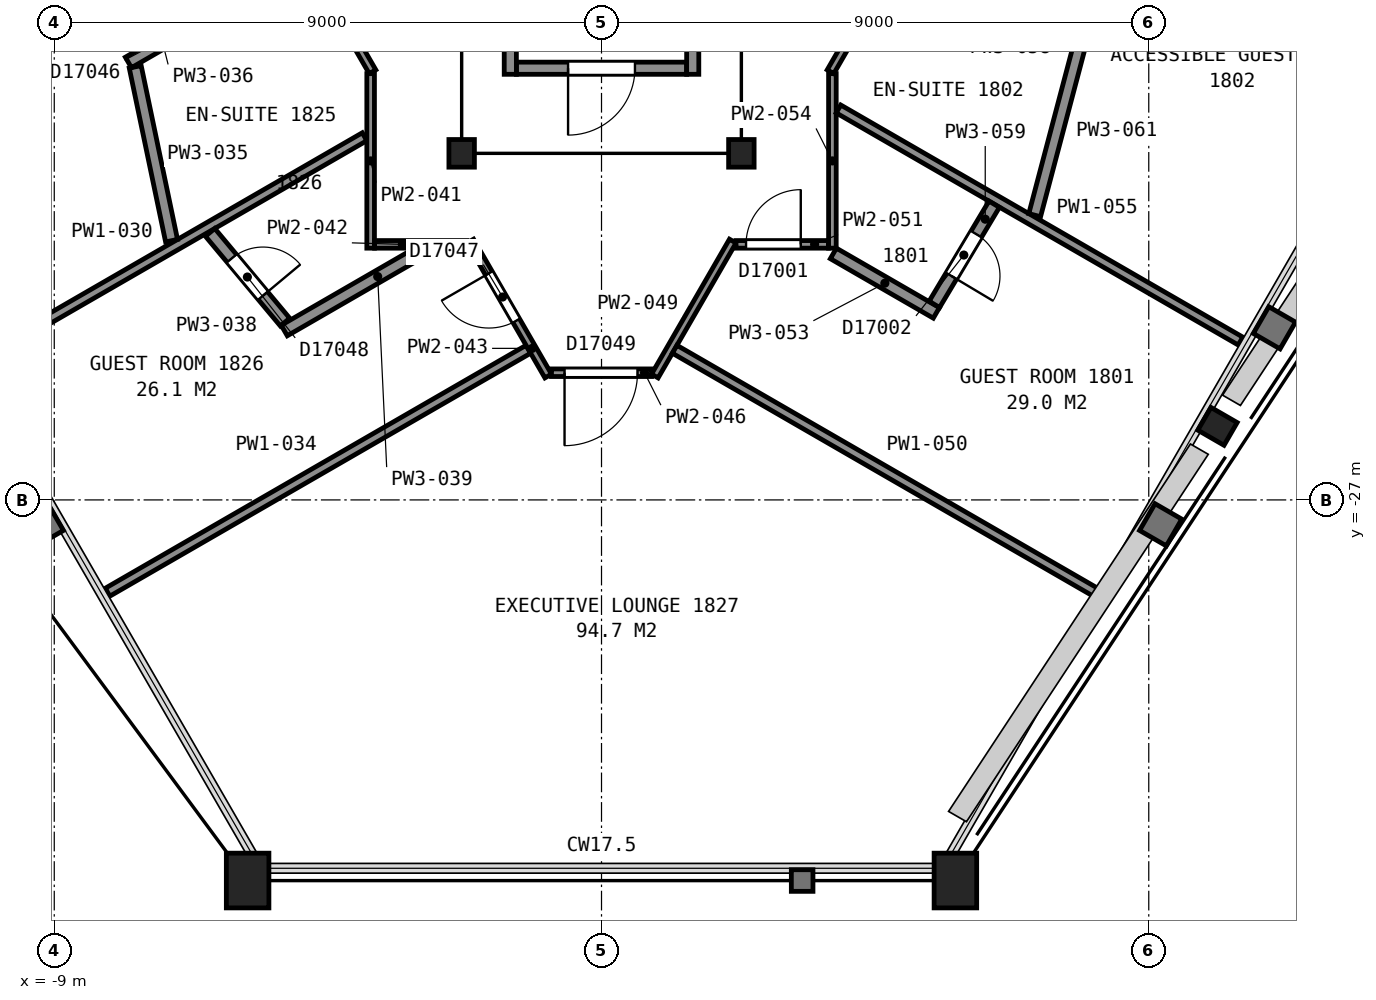
"""IFC4 building model, lengths in metres.
Left out: names, types, materials, properties, quantities, classifications, styles, units other than length and angle.
Written with IfcOpenShell. Run it as: python <this file> out.ifc"""

import sys

from ifc_helpers import new_model, si_unit, direction, frame, frame_2d, origin, origin_2d, place, context, subcontext, project, spatial, rectangle, hollow_rectangle, i_section, extrude, element, fill, save


model = new_model("IFC4")
c1 = context("Model", 3, precision=1e-05, world=origin(), true_north=direction((0.0, 1.0)))
c2 = subcontext(c1, "Body", "Model", "MODEL_VIEW")
j1 = project(units=[si_unit("LENGTHUNIT", "METRE"), si_unit("PLANEANGLEUNIT", "RADIAN")], contexts=[c1])
p1 = place(None, origin())
s1 = spatial("IfcSite", under=j1, at=p1, CompositionType="ELEMENT")
p2 = place(p1, origin())
s2 = spatial("IfcBuilding", under=s1, at=p2, CompositionType="ELEMENT")
p3 = place(p2, frame((0.0, 0.0, 80.0)))
s3 = spatial("IfcBuildingStorey", under=s2, at=p3, CompositionType="ELEMENT", Elevation=80.0)
for number, where, z_axis, x_axis in (
    (1, (-5.82, -33.26, 0.0), (0.0, 0.0, 1.0), (-1.0, 0.0, 0.0)),
    (2, (5.82, -33.26, 0.0), (0.0, 0.0, 1.0), (-1.0, 0.0, 0.0)),
):
    element("IfcColumn", number, at=place(p3, frame(where, z_axis=z_axis, x_axis=x_axis)), inside=s3, PredefinedType="COLUMN", context=c2, shape_type="SweptSolid", body=[
        extrude(hollow_rectangle(XDim=0.7, YDim=0.9, WallThickness=0.065, at=origin_2d()), origin(), (0.0, 0.0, 1.0), 3.6),
    ])
p4 = place(p3, frame((10.13, -25.79, 0.0), z_axis=(0.0, 0.0, 1.0), x_axis=(-0.5, -0.866025403784, 0.0)))
e3 = element("IfcColumn", 3, at=p4, inside=s3, PredefinedType="COLUMN", context=c2, shape_type="SweptSolid", body=[
    extrude(i_section(OverallWidth=0.432, OverallDepth=0.498, WebThickness=0.056, FlangeThickness=0.089, FilletRadius=0.015, at=origin_2d()), origin(), (0.0, 0.0, 1.0), 3.6),
])
for number, where, z_axis, x_axis in (
    (4, (-2.3, -21.3, 0.0), (0.0, 0.0, 1.0), (-1.0, 0.0, 0.0)),
    (5, (2.3, -21.3, 0.0), (0.0, 0.0, 1.0), (-1.0, 0.0, 0.0)),
):
    element("IfcColumn", number, at=place(p3, frame(where, z_axis=z_axis, x_axis=x_axis)), inside=s3, PredefinedType="COLUMN", context=c2, shape_type="SweptSolid", body=[
        extrude(i_section(OverallWidth=0.419, OverallDepth=0.455, WebThickness=0.042, FlangeThickness=0.068, FilletRadius=0.015, at=origin_2d()), origin(), (0.0, 0.0, 1.0), 3.6),
    ])
p5 = place(p3, frame((-1.4, -19.9, 0.0), z_axis=(0.0, 0.0, 1.0), x_axis=(1.0, 0.0, 0.0)))
e6 = element("IfcWall", 6, at=p5, inside=s3, PredefinedType="PARTITIONING", context=c2, shape_type="SweptSolid", body=[
    extrude(rectangle(XDim=2.8, YDim=0.2, at=frame_2d((1.4, 0.0))), origin(), (0.0, 0.0, 1.0), 3.35),
])
p6 = place(p5, frame((0.85, 0.0, 0.0)))
e7 = element("IfcOpeningElement", 7, at=p6, cuts=e6, PredefinedType="OPENING", context=c2, shape_type="SweptSolid", body=[
    extrude(rectangle(XDim=1.1, YDim=2.1, at=frame_2d((0.55, 1.05))), frame((0.0, 0.11, 0.0), z_axis=(0.0, -1.0, 0.0), x_axis=(1.0, 0.0, 0.0)), (0.0, 0.0, 1.0), 0.22),
])
for number, where, z_axis, x_axis in (
    (8, (1.5, -8.0, 0.0), (0.0, 0.0, 1.0), (0.0, -1.0, 0.0)),
    (9, (-1.5, -8.0, 0.0), (0.0, 0.0, 1.0), (0.0, -1.0, 0.0)),
):
    element("IfcWall", number, at=place(p3, frame(where, z_axis=z_axis, x_axis=x_axis)), inside=s3, PredefinedType="PARTITIONING", context=c2, shape_type="SweptSolid", body=[
        extrude(rectangle(XDim=12.0, YDim=0.2, at=frame_2d((6.0, 0.0))), origin(), (0.0, 0.0, 1.0), 3.35),
    ])
p7 = place(p3, frame((-3.766, -19.958, 0.0), z_axis=(0.0, 0.0, 1.0), x_axis=(-0.50002170027, 0.866012874765, 0.0)))
e10 = element("IfcWall", 10, at=p7, inside=s3, PredefinedType="PARTITIONING", context=c2, shape_type="SweptSolid", body=[
    extrude(rectangle(XDim=31.379, YDim=0.125, at=frame_2d((15.69, 0.0))), origin(), (0.0, 0.0, 1.0), 2.613),
])
p8 = place(p7, frame((25.28, 0.0, 0.0)))
e11 = element("IfcOpeningElement", 11, at=p8, cuts=e10, PredefinedType="OPENING", context=c2, shape_type="SweptSolid", body=[
    extrude(rectangle(XDim=1.5, YDim=2.1, at=frame_2d((0.75, 1.05))), frame((0.0, 0.073, 0.0), z_axis=(0.0, -1.0, 0.0), x_axis=(1.0, 0.0, 0.0)), (0.0, 0.0, 1.0), 0.145),
])
p9 = place(p7, frame((21.124, 0.0, 0.0)))
e12 = element("IfcOpeningElement", 12, at=p9, cuts=e10, PredefinedType="OPENING", context=c2, shape_type="SweptSolid", body=[
    extrude(rectangle(XDim=0.9, YDim=2.1, at=frame_2d((0.45, 1.05))), frame((0.0, 0.073, 0.0), z_axis=(0.0, -1.0, 0.0), x_axis=(1.0, 0.0, 0.0)), (0.0, 0.0, 1.0), 0.145),
])
p10 = place(p7, frame((14.349, 0.0, 0.0)))
e13 = element("IfcOpeningElement", 13, at=p10, cuts=e10, PredefinedType="OPENING", context=c2, shape_type="SweptSolid", body=[
    extrude(rectangle(XDim=0.9, YDim=2.1, at=frame_2d((0.45, 1.05))), frame((0.0, 0.073, 0.0), z_axis=(0.0, -1.0, 0.0), x_axis=(1.0, 0.0, 0.0)), (0.0, 0.0, 1.0), 0.145),
])
p11 = place(p7, frame((11.804, 0.0, 0.0)))
e14 = element("IfcOpeningElement", 14, at=p11, cuts=e10, PredefinedType="OPENING", context=c2, shape_type="SweptSolid", body=[
    extrude(rectangle(XDim=0.9, YDim=2.1, at=frame_2d((0.45, 1.05))), frame((0.0, 0.073, 0.0), z_axis=(0.0, -1.0, 0.0), x_axis=(1.0, 0.0, 0.0)), (0.0, 0.0, 1.0), 0.145),
])
p12 = place(p7, frame((5.33, 0.0, 0.0)))
e15 = element("IfcOpeningElement", 15, at=p12, cuts=e10, PredefinedType="OPENING", context=c2, shape_type="SweptSolid", body=[
    extrude(rectangle(XDim=0.9, YDim=2.1, at=frame_2d((0.45, 1.05))), frame((0.0, 0.073, 0.0), z_axis=(0.0, -1.0, 0.0), x_axis=(1.0, 0.0, 0.0)), (0.0, 0.0, 1.0), 0.145),
])
p13 = place(p7, frame((2.906, 0.0, 0.0)))
e16 = element("IfcOpeningElement", 16, at=p13, cuts=e10, PredefinedType="OPENING", context=c2, shape_type="SweptSolid", body=[
    extrude(rectangle(XDim=1.0, YDim=2.1, at=frame_2d((0.5, 1.05))), frame((0.0, 0.073, 0.0), z_axis=(0.0, -1.0, 0.0), x_axis=(1.0, 0.0, 0.0)), (0.0, 0.0, 1.0), 0.145),
])
p14 = place(p3, frame((-13.069, -19.953, 0.0), z_axis=(0.0, 0.0, 1.0), x_axis=(0.866021771655, 0.500006290979, 0.0)))
e17 = element("IfcWall", 17, at=p14, inside=s3, PredefinedType="PARTITIONING", context=c2, shape_type="SweptSolid", body=[
    extrude(rectangle(XDim=7.992, YDim=0.15, at=frame_2d((3.996, 0.0))), origin(), (0.0, 0.0, 1.0), 2.613),
])
p15 = place(p3, frame((-10.311, -24.73, 0.0), z_axis=(0.0, 0.0, 1.0), x_axis=(0.8660132178, 0.500021106151, 0.0)))
e18 = element("IfcWall", 18, at=p15, inside=s3, PredefinedType="PARTITIONING", context=c2, shape_type="SweptSolid", body=[
    extrude(rectangle(XDim=7.406, YDim=0.15, at=frame_2d((3.703, 0.0))), origin(), (0.0, 0.0, 1.0), 2.613),
])
p16 = place(p3, frame((-8.124, -28.518, 0.0), z_axis=(0.0, 0.0, 1.0), x_axis=(0.866021771655, 0.500006290979, 0.0)))
e19 = element("IfcWall", 19, at=p16, inside=s3, PredefinedType="PARTITIONING", context=c2, shape_type="SweptSolid", body=[
    extrude(rectangle(XDim=7.992, YDim=0.15, at=frame_2d((3.996, 0.0))), origin(), (0.0, 0.0, 1.0), 2.613),
])
p17 = place(p3, frame((-7.668, -19.877, 0.0), z_axis=(0.0, 0.0, 1.0), x_axis=(0.204611748063, -0.978843211426, 0.0)))
e20 = element("IfcWall", 20, at=p17, inside=s3, PredefinedType="PARTITIONING", context=c2, shape_type="SweptSolid", body=[
    extrude(rectangle(XDim=2.921, YDim=0.2, at=frame_2d((1.46, 0.0))), origin(), (0.0, 0.0, 1.0), 2.613),
])
p18 = place(p3, frame((-4.89, -18.136, 0.0), z_axis=(0.0, 0.0, 1.0), x_axis=(-0.866033317326, -0.499986293093, 0.0)))
e21 = element("IfcWall", 21, at=p18, inside=s3, PredefinedType="PARTITIONING", context=c2, shape_type="SweptSolid", body=[
    extrude(rectangle(XDim=3.337, YDim=0.2, at=frame_2d((1.669, 0.0))), origin(), (0.0, 0.0, 1.0), 2.613),
])
p19 = place(p18, frame((1.138, 0.0, 0.0)))
e22 = element("IfcOpeningElement", 22, at=p19, cuts=e21, PredefinedType="OPENING", context=c2, shape_type="SweptSolid", body=[
    extrude(rectangle(XDim=0.9, YDim=2.1, at=frame_2d((0.45, 1.05))), frame((0.0, 0.11, 0.0), z_axis=(0.0, -1.0, 0.0), x_axis=(1.0, 0.0, 0.0)), (0.0, 0.0, 1.0), 0.22),
])
p20 = place(p3, frame((-6.437, -22.6, 0.0), z_axis=(0.0, 0.0, 1.0), x_axis=(0.640970893908, -0.76756518496, 0.0)))
e23 = element("IfcWall", 23, at=p20, inside=s3, PredefinedType="PARTITIONING", context=c2, shape_type="SweptSolid", body=[
    extrude(rectangle(XDim=1.923, YDim=0.2, at=frame_2d((0.961, 0.0))), origin(), (0.0, 0.0, 1.0), 2.613),
])
p21 = place(p20, frame((0.556, 0.0, 0.0)))
e24 = element("IfcOpeningElement", 24, at=p21, cuts=e23, PredefinedType="OPENING", context=c2, shape_type="SweptSolid", body=[
    extrude(rectangle(XDim=0.8, YDim=2.1, at=frame_2d((0.4, 1.05))), frame((0.0, 0.11, 0.0), z_axis=(0.0, -1.0, 0.0), x_axis=(1.0, 0.0, 0.0)), (0.0, 0.0, 1.0), 0.22),
])
p22 = place(p3, frame((-5.218, -24.214, 0.0), z_axis=(0.0, 0.0, 1.0), x_axis=(0.865922540442, 0.500178122226, 0.0)))
e25 = element("IfcWall", 25, at=p22, inside=s3, PredefinedType="PARTITIONING", context=c2, shape_type="SweptSolid", body=[
    extrude(rectangle(XDim=2.535, YDim=0.2, at=frame_2d((1.268, 0.0))), origin(), (0.0, 0.0, 1.0), 2.613),
])
p23 = place(p3, frame((-3.797, -22.86, 0.0), z_axis=(0.0, 0.0, 1.0), x_axis=(0.0, 1.0, 0.0)))
e26 = element("IfcWall", 26, at=p23, inside=s3, PredefinedType="PARTITIONING", context=c2, shape_type="SweptSolid", body=[
    extrude(rectangle(XDim=2.871, YDim=0.125, at=frame_2d((1.435, 0.0))), origin(), (0.0, 0.0, 1.0), 2.613),
])
p24 = place(p3, frame((-3.732, -22.797, 0.0), z_axis=(0.0, 0.0, 1.0), x_axis=(1.0, 0.0, 0.0)))
e27 = element("IfcWall", 27, at=p24, inside=s3, PredefinedType="PARTITIONING", context=c2, shape_type="SweptSolid", body=[
    extrude(rectangle(XDim=1.52, YDim=0.125, at=frame_2d((0.76, 0.0))), origin(), (0.0, 0.0, 1.0), 2.613),
])
p25 = place(p3, frame((-0.877, -24.962, 0.0), z_axis=(0.0, 0.0, 1.0), x_axis=(-0.500063308241, 0.865988849669, 0.0)))
e28 = element("IfcWall", 28, at=p25, inside=s3, PredefinedType="PARTITIONING", context=c2, shape_type="SweptSolid", body=[
    extrude(rectangle(XDim=2.563, YDim=0.125, at=frame_2d((1.281, 0.0))), origin(), (0.0, 0.0, 1.0), 2.613),
])
p26 = place(p25, frame((1.05, 0.0, 0.0)))
e29 = element("IfcOpeningElement", 29, at=p26, cuts=e28, PredefinedType="OPENING", context=c2, shape_type="SweptSolid", body=[
    extrude(rectangle(XDim=0.9, YDim=2.1, at=frame_2d((0.45, 1.05))), frame((0.0, 0.073, 0.0), z_axis=(0.0, -1.0, 0.0), x_axis=(1.0, 0.0, 0.0)), (0.0, 0.0, 1.0), 0.145),
])
p27 = place(p3, frame((0.823, -24.908, 0.0), z_axis=(0.0, 0.0, 1.0), x_axis=(-1.0, 0.0, 0.0)))
e30 = element("IfcWall", 30, at=p27, inside=s3, PredefinedType="PARTITIONING", context=c2, shape_type="SweptSolid", body=[
    extrude(rectangle(XDim=1.646, YDim=0.125, at=frame_2d((0.823, 0.0))), origin(), (0.0, 0.0, 1.0), 2.613),
])
p28 = place(p27, frame((0.231, 0.0, 0.0)))
e31 = element("IfcOpeningElement", 31, at=p28, cuts=e30, PredefinedType="OPENING", context=c2, shape_type="SweptSolid", body=[
    extrude(rectangle(XDim=1.2, YDim=2.1, at=frame_2d((0.6, 1.05))), frame((0.0, 0.073, 0.0), z_axis=(0.0, -1.0, 0.0), x_axis=(1.0, 0.0, 0.0)), (0.0, 0.0, 1.0), 0.145),
])
p29 = place(p3, frame((0.877, -24.962, 0.0), z_axis=(0.0, 0.0, 1.0), x_axis=(0.500063308241, 0.865988849669, 0.0)))
e32 = element("IfcWall", 32, at=p29, inside=s3, PredefinedType="PARTITIONING", context=c2, shape_type="SweptSolid", body=[
    extrude(rectangle(XDim=2.563, YDim=0.125, at=frame_2d((1.281, 0.0))), origin(), (0.0, 0.0, 1.0), 2.613),
])
p30 = place(p3, frame((1.203, -24.522, 0.0), z_axis=(0.0, 0.0, 1.0), x_axis=(0.866021771655, -0.500006290979, 0.0)))
e33 = element("IfcWall", 33, at=p30, inside=s3, PredefinedType="PARTITIONING", context=c2, shape_type="SweptSolid", body=[
    extrude(rectangle(XDim=7.992, YDim=0.15, at=frame_2d((3.996, 0.0))), origin(), (0.0, 0.0, 1.0), 2.613),
])
p31 = place(p3, frame((3.732, -22.797, 0.0), z_axis=(0.0, 0.0, 1.0), x_axis=(-1.0, 0.0, 0.0)))
e34 = element("IfcWall", 34, at=p31, inside=s3, PredefinedType="PARTITIONING", context=c2, shape_type="SweptSolid", body=[
    extrude(rectangle(XDim=1.52, YDim=0.125, at=frame_2d((0.76, 0.0))), origin(), (0.0, 0.0, 1.0), 2.613),
])
p32 = place(p31, frame((0.455, 0.0, 0.0)))
e35 = element("IfcOpeningElement", 35, at=p32, cuts=e34, PredefinedType="OPENING", context=c2, shape_type="SweptSolid", body=[
    extrude(rectangle(XDim=0.9, YDim=2.1, at=frame_2d((0.45, 1.05))), frame((0.0, 0.073, 0.0), z_axis=(0.0, -1.0, 0.0), x_axis=(1.0, 0.0, 0.0)), (0.0, 0.0, 1.0), 0.145),
])
p33 = place(p3, frame((3.813, -22.946, 0.0), z_axis=(0.0, 0.0, 1.0), x_axis=(0.865944380701, -0.500140309845, 0.0)))
e36 = element("IfcWall", 36, at=p33, inside=s3, PredefinedType="PARTITIONING", context=c2, shape_type="SweptSolid", body=[
    extrude(rectangle(XDim=1.956, YDim=0.2, at=frame_2d((0.978, 0.0))), origin(), (0.0, 0.0, 1.0), 2.613),
])
p34 = place(p3, frame((3.797, -22.86, 0.0), z_axis=(0.0, 0.0, 1.0), x_axis=(0.0, 1.0, 0.0)))
e37 = element("IfcWall", 37, at=p34, inside=s3, PredefinedType="PARTITIONING", context=c2, shape_type="SweptSolid", body=[
    extrude(rectangle(XDim=2.871, YDim=0.125, at=frame_2d((1.435, 0.0))), origin(), (0.0, 0.0, 1.0), 2.613),
])
p35 = place(p3, frame((3.897, -20.57, 0.0), z_axis=(0.0, 0.0, 1.0), x_axis=(0.866030628547, -0.499990950336, 0.0)))
e38 = element("IfcWall", 38, at=p35, inside=s3, PredefinedType="PARTITIONING", context=c2, shape_type="SweptSolid", body=[
    extrude(rectangle(XDim=7.635, YDim=0.15, at=frame_2d((3.817, 0.0))), origin(), (0.0, 0.0, 1.0), 2.613),
])
p36 = place(p3, frame((19.456, 7.217, 0.0), z_axis=(0.0, 0.0, 1.0), x_axis=(-0.50002170027, -0.866012874765, 0.0)))
e39 = element("IfcWall", 39, at=p36, inside=s3, PredefinedType="PARTITIONING", context=c2, shape_type="SweptSolid", body=[
    extrude(rectangle(XDim=31.379, YDim=0.125, at=frame_2d((15.69, 0.0))), origin(), (0.0, 0.0, 1.0), 2.613),
])
p37 = place(p36, frame((26.843, 0.0, 0.0)))
e40 = element("IfcOpeningElement", 40, at=p37, cuts=e39, PredefinedType="OPENING", context=c2, shape_type="SweptSolid", body=[
    extrude(rectangle(XDim=1.0, YDim=2.1, at=frame_2d((0.5, 1.05))), frame((0.0, 0.073, 0.0), z_axis=(0.0, -1.0, 0.0), x_axis=(1.0, 0.0, 0.0)), (0.0, 0.0, 1.0), 0.145),
])
p38 = place(p36, frame((24.03, 0.0, 0.0)))
e41 = element("IfcOpeningElement", 41, at=p38, cuts=e39, PredefinedType="OPENING", context=c2, shape_type="SweptSolid", body=[
    extrude(rectangle(XDim=0.9, YDim=2.1, at=frame_2d((0.45, 1.05))), frame((0.0, 0.073, 0.0), z_axis=(0.0, -1.0, 0.0), x_axis=(1.0, 0.0, 0.0)), (0.0, 0.0, 1.0), 0.145),
])
p39 = place(p36, frame((17.159, 0.0, 0.0)))
e42 = element("IfcOpeningElement", 42, at=p39, cuts=e39, PredefinedType="OPENING", context=c2, shape_type="SweptSolid", body=[
    extrude(rectangle(XDim=0.9, YDim=2.1, at=frame_2d((0.45, 1.05))), frame((0.0, 0.073, 0.0), z_axis=(0.0, -1.0, 0.0), x_axis=(1.0, 0.0, 0.0)), (0.0, 0.0, 1.0), 0.145),
])
p40 = place(p36, frame((14.24, 0.0, 0.0)))
e43 = element("IfcOpeningElement", 43, at=p40, cuts=e39, PredefinedType="OPENING", context=c2, shape_type="SweptSolid", body=[
    extrude(rectangle(XDim=0.9, YDim=2.1, at=frame_2d((0.45, 1.05))), frame((0.0, 0.073, 0.0), z_axis=(0.0, -1.0, 0.0), x_axis=(1.0, 0.0, 0.0)), (0.0, 0.0, 1.0), 0.145),
])
p41 = place(p36, frame((6.997, 0.0, 0.0)))
e44 = element("IfcOpeningElement", 44, at=p41, cuts=e39, PredefinedType="OPENING", context=c2, shape_type="SweptSolid", body=[
    extrude(rectangle(XDim=0.9, YDim=2.1, at=frame_2d((0.45, 1.05))), frame((0.0, 0.073, 0.0), z_axis=(0.0, -1.0, 0.0), x_axis=(1.0, 0.0, 0.0)), (0.0, 0.0, 1.0), 0.145),
])
p42 = place(p36, frame((4.327, 0.0, 0.0)))
e45 = element("IfcOpeningElement", 45, at=p42, cuts=e39, PredefinedType="OPENING", context=c2, shape_type="SweptSolid", body=[
    extrude(rectangle(XDim=0.9, YDim=2.1, at=frame_2d((0.45, 1.05))), frame((0.0, 0.073, 0.0), z_axis=(0.0, -1.0, 0.0), x_axis=(1.0, 0.0, 0.0)), (0.0, 0.0, 1.0), 0.145),
])
p43 = place(p3, frame((5.474, -23.784, 0.0), z_axis=(0.0, 0.0, 1.0), x_axis=(0.512791921509, 0.858512926656, 0.0)))
e46 = element("IfcWall", 46, at=p43, inside=s3, PredefinedType="PARTITIONING", context=c2, shape_type="SweptSolid", body=[
    extrude(rectangle(XDim=1.919, YDim=0.2, at=frame_2d((0.959, 0.0))), origin(), (0.0, 0.0, 1.0), 2.613),
])
p44 = place(p43, frame((0.545, 0.0, 0.0)))
e47 = element("IfcOpeningElement", 47, at=p44, cuts=e46, PredefinedType="OPENING", context=c2, shape_type="SweptSolid", body=[
    extrude(rectangle(XDim=0.8, YDim=2.1, at=frame_2d((0.4, 1.05))), frame((0.0, 0.11, 0.0), z_axis=(0.0, -1.0, 0.0), x_axis=(1.0, 0.0, 0.0)), (0.0, 0.0, 1.0), 0.22),
])
p45 = place(p3, frame((7.124, -22.317, 0.0), z_axis=(0.0, 0.0, 1.0), x_axis=(0.255720101769, 0.966750862193, 0.0)))
e48 = element("IfcWall", 48, at=p45, inside=s3, PredefinedType="PARTITIONING", context=c2, shape_type="SweptSolid", body=[
    extrude(rectangle(XDim=2.879, YDim=0.2, at=frame_2d((1.44, 0.0))), origin(), (0.0, 0.0, 1.0), 2.613),
])
p46 = place(p6, origin())
e49 = element("IfcDoor", 49, at=p46, inside=s3, OperationType="SINGLE_SWING_LEFT", PredefinedType="DOOR", context=c2, shape_type="SweptSolid", body=[
    extrude(rectangle(XDim=1.1, YDim=2.1, at=frame_2d((0.55, 1.05))), frame((0.0, 0.025, 0.0), z_axis=(0.0, -1.0, 0.0), x_axis=(1.0, 0.0, 0.0)), (0.0, 0.0, 1.0), 0.05),
])
fill(e7, e49)
p47 = place(p21, origin())
e50 = element("IfcDoor", 50, at=p47, inside=s3, OperationType="SINGLE_SWING_RIGHT", PredefinedType="DOOR", context=c2, shape_type="SweptSolid", body=[
    extrude(rectangle(XDim=0.8, YDim=2.1, at=frame_2d((0.4, 1.05))), frame((0.0, 0.025, 0.0), z_axis=(0.0, -1.0, 0.0), x_axis=(1.0, 0.0, 0.0)), (0.0, 0.0, 1.0), 0.05),
])
fill(e24, e50)
p48 = place(p26, origin())
e51 = element("IfcDoor", 51, at=p48, inside=s3, OperationType="SINGLE_SWING_RIGHT", PredefinedType="DOOR", context=c2, shape_type="SweptSolid", body=[
    extrude(rectangle(XDim=0.9, YDim=2.1, at=frame_2d((0.45, 1.05))), frame((0.0, 0.025, 0.0), z_axis=(0.0, -1.0, 0.0), x_axis=(1.0, 0.0, 0.0)), (0.0, 0.0, 1.0), 0.05),
])
fill(e29, e51)
p49 = place(p28, origin())
e52 = element("IfcDoor", 52, at=p49, inside=s3, OperationType="SINGLE_SWING_RIGHT", PredefinedType="DOOR", context=c2, shape_type="SweptSolid", body=[
    extrude(rectangle(XDim=1.2, YDim=2.1, at=frame_2d((0.6, 1.05))), frame((0.0, 0.025, 0.0), z_axis=(0.0, -1.0, 0.0), x_axis=(1.0, 0.0, 0.0)), (0.0, 0.0, 1.0), 0.05),
])
fill(e31, e52)
p50 = place(p32, origin())
e53 = element("IfcDoor", 53, at=p50, inside=s3, OperationType="SINGLE_SWING_LEFT", PredefinedType="DOOR", context=c2, shape_type="SweptSolid", body=[
    extrude(rectangle(XDim=0.9, YDim=2.1, at=frame_2d((0.45, 1.05))), frame((0.0, 0.025, 0.0), z_axis=(0.0, -1.0, 0.0), x_axis=(1.0, 0.0, 0.0)), (0.0, 0.0, 1.0), 0.05),
])
fill(e35, e53)
p51 = place(p44, origin())
e54 = element("IfcDoor", 54, at=p51, inside=s3, OperationType="SINGLE_SWING_LEFT", PredefinedType="DOOR", context=c2, shape_type="SweptSolid", body=[
    extrude(rectangle(XDim=0.8, YDim=2.1, at=frame_2d((0.4, 1.05))), frame((0.0, 0.025, 0.0), z_axis=(0.0, -1.0, 0.0), x_axis=(1.0, 0.0, 0.0)), (0.0, 0.0, 1.0), 0.05),
])
fill(e47, e54)
save(model, sys.argv[1])
